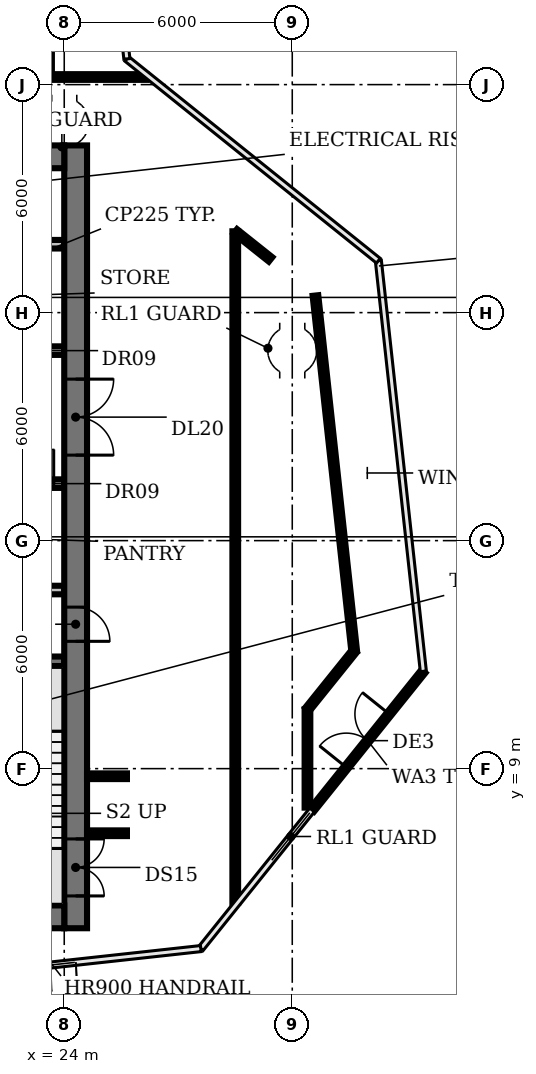
"""IFC4 building model, lengths in metres.
Left out: names, types, materials, properties, quantities, classifications, styles, units other than length and angle.
Written with IfcOpenShell. Run it as: python <this file> out.ifc"""

import sys

from ifc_helpers import new_model, si_unit, direction, frame, frame_2d, origin, place, context, subcontext, project, spatial, rectangle, extrude, element, fill, save


model = new_model("IFC4")
c1 = context("Model", 3, precision=1e-05, world=origin(), true_north=direction((0.0, 1.0)))
c2 = subcontext(c1, "Body", "Model", "MODEL_VIEW")
j1 = project(units=[si_unit("LENGTHUNIT", "METRE"), si_unit("PLANEANGLEUNIT", "RADIAN")], contexts=[c1])
p1 = place(None, origin())
s1 = spatial("IfcSite", under=j1, at=p1, CompositionType="ELEMENT")
p2 = place(p1, origin())
s2 = spatial("IfcBuilding", under=s1, at=p2, CompositionType="ELEMENT")
p3 = place(p2, frame((0.0, 0.0, 197.0)))
s3 = spatial("IfcBuildingStorey", under=s2, at=p3, CompositionType="ELEMENT", Elevation=197.0)
p4 = place(p3, frame((30.521, 7.912, 0.0), z_axis=(0.0, 0.0, 1.0), x_axis=(0.625916397506, 0.779890161069, 0.0)))
e1 = element("IfcWall", 1, at=p4, inside=s3, PredefinedType="SOLIDWALL", context=c2, shape_type="SweptSolid", body=[
    extrude(rectangle(XDim=4.677, YDim=0.14, at=frame_2d((2.339, 0.0))), origin(), (0.0, 0.0, 1.0), 8.05),
])
p5 = place(p4, frame((1.439, 0.0, 0.0)))
e2 = element("IfcOpeningElement", 2, at=p5, cuts=e1, PredefinedType="OPENING", context=c2, shape_type="SweptSolid", body=[
    extrude(rectangle(XDim=1.8, YDim=2.4, at=frame_2d((0.9, 1.2))), frame((0.0, 0.08, 0.0), z_axis=(0.0, -1.0, 0.0), x_axis=(1.0, 0.0, 0.0)), (0.0, 0.0, 1.0), 0.16),
])
p6 = place(p3, frame((20.85, 11.825, 0.0), z_axis=(0.0, 0.0, 1.0), x_axis=(1.0, 0.0, 0.0)))
e3 = element("IfcWall", 3, at=p6, inside=s3, PredefinedType="SHEAR", context=c2, shape_type="SweptSolid", body=[
    extrude(rectangle(XDim=3.15, YDim=0.25, at=frame_2d((1.575, 0.0))), origin(), (0.0, 0.0, 1.0), 8.05),
])
p7 = place(p3, frame((16.6, 13.7, 0.0), z_axis=(0.0, 0.0, 1.0), x_axis=(1.0, 0.0, 0.0)))
e4 = element("IfcWall", 4, at=p7, inside=s3, PredefinedType="PARTITIONING", context=c2, shape_type="SweptSolid", body=[
    extrude(rectangle(XDim=7.4, YDim=0.225, at=frame_2d((3.7, 0.0))), origin(), (0.0, 0.0, 1.0), 8.05),
])
p8 = place(p3, frame((9.4, 16.5, 0.0), z_axis=(0.0, 0.0, 1.0), x_axis=(1.0, 0.0, 0.0)))
e5 = element("IfcWall", 5, at=p8, inside=s3, PredefinedType="PARTITIONING", context=c2, shape_type="SweptSolid", body=[
    extrude(rectangle(XDim=14.6, YDim=0.225, at=frame_2d((7.3, 0.0))), origin(), (0.0, 0.0, 1.0), 8.05),
])
p9 = place(p8, frame((1.6, 0.0, 0.0)))
e6 = element("IfcOpeningElement", 6, at=p9, cuts=e5, PredefinedType="OPENING", context=c2, shape_type="SweptSolid", body=[
    extrude(rectangle(XDim=1.0, YDim=2.1, at=frame_2d((0.5, 1.05))), frame((0.0, 0.123, 0.0), z_axis=(0.0, -1.0, 0.0), x_axis=(1.0, 0.0, 0.0)), (0.0, 0.0, 1.0), 0.245),
])
p10 = place(p8, frame((5.125, 0.0, 0.0)))
e7 = element("IfcOpeningElement", 7, at=p10, cuts=e5, PredefinedType="OPENING", context=c2, shape_type="SweptSolid", body=[
    extrude(rectangle(XDim=0.9, YDim=2.1, at=frame_2d((0.45, 1.05))), frame((0.0, 0.123, 0.0), z_axis=(0.0, -1.0, 0.0), x_axis=(1.0, 0.0, 0.0)), (0.0, 0.0, 1.0), 0.245),
])
p11 = place(p8, frame((7.675, 0.0, 0.0)))
e8 = element("IfcOpeningElement", 8, at=p11, cuts=e5, PredefinedType="OPENING", context=c2, shape_type="SweptSolid", body=[
    extrude(rectangle(XDim=0.9, YDim=2.1, at=frame_2d((0.45, 1.05))), frame((0.0, 0.123, 0.0), z_axis=(0.0, -1.0, 0.0), x_axis=(1.0, 0.0, 0.0)), (0.0, 0.0, 1.0), 0.245),
])
p12 = place(p8, frame((9.775, 0.0, 0.0)))
e9 = element("IfcOpeningElement", 9, at=p12, cuts=e5, PredefinedType="OPENING", context=c2, shape_type="SweptSolid", body=[
    extrude(rectangle(XDim=0.9, YDim=2.1, at=frame_2d((0.45, 1.05))), frame((0.0, 0.123, 0.0), z_axis=(0.0, -1.0, 0.0), x_axis=(1.0, 0.0, 0.0)), (0.0, 0.0, 1.0), 0.245),
])
p13 = place(p8, frame((11.647, 0.0, 0.0)))
e10 = element("IfcOpeningElement", 10, at=p13, cuts=e5, PredefinedType="OPENING", context=c2, shape_type="SweptSolid", body=[
    extrude(rectangle(XDim=0.9, YDim=2.1, at=frame_2d((0.45, 1.05))), frame((0.0, 0.123, 0.0), z_axis=(0.0, -1.0, 0.0), x_axis=(1.0, 0.0, 0.0)), (0.0, 0.0, 1.0), 0.245),
])
p14 = place(p8, frame((13.423, 0.0, 0.0)))
e11 = element("IfcOpeningElement", 11, at=p14, cuts=e5, PredefinedType="OPENING", context=c2, shape_type="SweptSolid", body=[
    extrude(rectangle(XDim=0.9, YDim=2.1, at=frame_2d((0.45, 1.05))), frame((0.0, 0.123, 0.0), z_axis=(0.0, -1.0, 0.0), x_axis=(1.0, 0.0, 0.0)), (0.0, 0.0, 1.0), 0.245),
])
p15 = place(p3, frame((24.0, 20.0, 0.0), z_axis=(0.0, 0.0, 1.0), x_axis=(-1.0, 0.0, 0.0)))
e12 = element("IfcWall", 12, at=p15, inside=s3, PredefinedType="PARTITIONING", context=c2, shape_type="SweptSolid", body=[
    extrude(rectangle(XDim=14.6, YDim=0.225, at=frame_2d((7.3, 0.0))), origin(), (0.0, 0.0, 1.0), 8.05),
])
p16 = place(p15, frame((12.75, 0.0, 0.0)))
e13 = element("IfcOpeningElement", 13, at=p16, cuts=e12, PredefinedType="OPENING", context=c2, shape_type="SweptSolid", body=[
    extrude(rectangle(XDim=1.1, YDim=2.1, at=frame_2d((0.55, 1.05))), frame((0.0, 0.123, 0.0), z_axis=(0.0, -1.0, 0.0), x_axis=(1.0, 0.0, 0.0)), (0.0, 0.0, 1.0), 0.245),
])
p17 = place(p15, frame((9.95, 0.0, 0.0)))
e14 = element("IfcOpeningElement", 14, at=p17, cuts=e12, PredefinedType="OPENING", context=c2, shape_type="SweptSolid", body=[
    extrude(rectangle(XDim=1.1, YDim=2.1, at=frame_2d((0.55, 1.05))), frame((0.0, 0.123, 0.0), z_axis=(0.0, -1.0, 0.0), x_axis=(1.0, 0.0, 0.0)), (0.0, 0.0, 1.0), 0.245),
])
p18 = place(p15, frame((7.15, 0.0, 0.0)))
e15 = element("IfcOpeningElement", 15, at=p18, cuts=e12, PredefinedType="OPENING", context=c2, shape_type="SweptSolid", body=[
    extrude(rectangle(XDim=1.1, YDim=2.1, at=frame_2d((0.55, 1.05))), frame((0.0, 0.123, 0.0), z_axis=(0.0, -1.0, 0.0), x_axis=(1.0, 0.0, 0.0)), (0.0, 0.0, 1.0), 0.245),
])
p19 = place(p15, frame((4.35, 0.0, 0.0)))
e16 = element("IfcOpeningElement", 16, at=p19, cuts=e12, PredefinedType="OPENING", context=c2, shape_type="SweptSolid", body=[
    extrude(rectangle(XDim=1.1, YDim=2.1, at=frame_2d((0.55, 1.05))), frame((0.0, 0.123, 0.0), z_axis=(0.0, -1.0, 0.0), x_axis=(1.0, 0.0, 0.0)), (0.0, 0.0, 1.0), 0.245),
])
p20 = place(p15, frame((2.137, 0.0, 0.0)))
e17 = element("IfcOpeningElement", 17, at=p20, cuts=e12, PredefinedType="OPENING", context=c2, shape_type="SweptSolid", body=[
    extrude(rectangle(XDim=0.9, YDim=2.1, at=frame_2d((0.45, 1.05))), frame((0.0, 0.123, 0.0), z_axis=(0.0, -1.0, 0.0), x_axis=(1.0, 0.0, 0.0)), (0.0, 0.0, 1.0), 0.245),
])
p21 = place(p15, frame((0.363, 0.0, 0.0)))
e18 = element("IfcOpeningElement", 18, at=p21, cuts=e12, PredefinedType="OPENING", context=c2, shape_type="SweptSolid", body=[
    extrude(rectangle(XDim=0.9, YDim=2.1, at=frame_2d((0.45, 1.05))), frame((0.0, 0.123, 0.0), z_axis=(0.0, -1.0, 0.0), x_axis=(1.0, 0.0, 0.0)), (0.0, 0.0, 1.0), 0.245),
])
p22 = place(p3, frame((9.4, 22.8, 0.0), z_axis=(0.0, 0.0, 1.0), x_axis=(1.0, 0.0, 0.0)))
e19 = element("IfcWall", 19, at=p22, inside=s3, PredefinedType="PARTITIONING", context=c2, shape_type="SweptSolid", body=[
    extrude(rectangle(XDim=14.6, YDim=0.225, at=frame_2d((7.3, 0.0))), origin(), (0.0, 0.0, 1.0), 8.05),
])
p23 = place(p3, frame((24.3, 25.4, 0.0), z_axis=(0.0, 0.0, 1.0), x_axis=(0.0, -1.0, 0.0)))
e20 = element("IfcWall", 20, at=p23, inside=s3, PredefinedType="SHEAR", context=c2, shape_type="SweptSolid", body=[
    extrude(rectangle(XDim=20.6, YDim=0.6, at=frame_2d((10.3, 0.0))), origin(), (0.0, 0.0, 1.0), 8.05),
])
p24 = place(p23, frame((18.25, 0.0, 0.0)))
e21 = element("IfcOpeningElement", 21, at=p24, cuts=e20, PredefinedType="OPENING", context=c2, shape_type="SweptSolid", body=[
    extrude(rectangle(XDim=1.5, YDim=2.1, at=frame_2d((0.75, 1.05))), frame((0.0, 0.31, 0.0), z_axis=(0.0, -1.0, 0.0), x_axis=(1.0, 0.0, 0.0)), (0.0, 0.0, 1.0), 0.62),
])
p25 = place(p23, frame((12.15, 0.0, 0.0)))
e22 = element("IfcOpeningElement", 22, at=p25, cuts=e20, PredefinedType="OPENING", context=c2, shape_type="SweptSolid", body=[
    extrude(rectangle(XDim=0.9, YDim=2.1, at=frame_2d((0.45, 1.05))), frame((0.0, 0.31, 0.0), z_axis=(0.0, -1.0, 0.0), x_axis=(1.0, 0.0, 0.0)), (0.0, 0.0, 1.0), 0.62),
])
p26 = place(p23, frame((6.15, 0.0, 0.0)))
e23 = element("IfcOpeningElement", 23, at=p26, cuts=e20, PredefinedType="OPENING", context=c2, shape_type="SweptSolid", body=[
    extrude(rectangle(XDim=2.0, YDim=2.1, at=frame_2d((1.0, 1.05))), frame((0.0, 0.31, 0.0), z_axis=(0.0, -1.0, 0.0), x_axis=(1.0, 0.0, 0.0)), (0.0, 0.0, 1.0), 0.62),
])
p27 = place(p3, frame((24.0, 5.1, 0.0), z_axis=(0.0, 0.0, 1.0), x_axis=(-1.0, 0.0, 0.0)))
e24 = element("IfcWall", 24, at=p27, inside=s3, PredefinedType="SHEAR", context=c2, shape_type="SweptSolid", body=[
    extrude(rectangle(XDim=18.0, YDim=0.6, at=frame_2d((9.0, 0.0))), origin(), (0.0, 0.0, 1.0), 8.05),
])
p28 = place(p27, frame((13.0, 0.0, 0.0)))
e25 = element("IfcOpeningElement", 25, at=p28, cuts=e24, PredefinedType="OPENING", context=c2, shape_type="SweptSolid", body=[
    extrude(rectangle(XDim=1.2, YDim=2.1, at=frame_2d((0.6, 1.05))), frame((0.0, 0.31, 0.0), z_axis=(0.0, -1.0, 0.0), x_axis=(1.0, 0.0, 0.0)), (0.0, 0.0, 1.0), 0.62),
])
p29 = place(p27, frame((4.9, 0.0, 0.0)))
e26 = element("IfcOpeningElement", 26, at=p29, cuts=e24, PredefinedType="OPENING", context=c2, shape_type="SweptSolid", body=[
    extrude(rectangle(XDim=1.0, YDim=2.1, at=frame_2d((0.5, 1.05))), frame((0.0, 0.31, 0.0), z_axis=(0.0, -1.0, 0.0), x_axis=(1.0, 0.0, 0.0)), (0.0, 0.0, 1.0), 0.62),
])
p30 = place(p3, frame((6.0, 25.1, 0.0), z_axis=(0.0, 0.0, 1.0), x_axis=(1.0, 0.0, 0.0)))
e27 = element("IfcWall", 27, at=p30, inside=s3, PredefinedType="SHEAR", context=c2, shape_type="SweptSolid", body=[
    extrude(rectangle(XDim=18.0, YDim=0.6, at=frame_2d((9.0, 0.0))), origin(), (0.0, 0.0, 1.0), 8.05),
])
p31 = place(p3, frame((23.6, 27.2, 0.0), z_axis=(0.0, 0.0, 1.0), x_axis=(1.0, 0.0, 0.0)))
e28 = element("IfcWall", 28, at=p31, inside=s3, PredefinedType="PARTITIONING", context=c2, shape_type="SweptSolid", body=[
    extrude(rectangle(XDim=2.56, YDim=0.15, at=frame_2d((1.28, 0.0))), origin(), (0.0, 0.0, 1.0), 6.33),
])
for number, where, z_axis, x_axis in (
    (29, (24.6, 7.3, 0.0), (0.0, 0.0, 1.0), (1.0, 0.0, 0.0)),
    (30, (24.6, 8.8, 0.0), (0.0, 0.0, 1.0), (1.0, 0.0, 0.0)),
):
    element("IfcWall", number, at=place(p3, frame(where, z_axis=z_axis, x_axis=x_axis)), inside=s3, PredefinedType="PARTITIONING", context=c2, shape_type="SweptSolid", body=[
        extrude(rectangle(XDim=1.05, YDim=0.15, at=frame_2d((0.525, 0.0))), origin(), (0.0, 0.0, 1.0), 6.33),
    ])
p32 = place(p3, frame((28.5, 5.47, 0.0), z_axis=(0.0, 0.0, 1.0), x_axis=(0.0, 1.0, 0.0)))
e31 = element("IfcWall", 31, at=p32, inside=s3, PredefinedType="PARTITIONING", context=c2, shape_type="SweptSolid", body=[
    extrude(rectangle(XDim=17.67, YDim=0.15, at=frame_2d((8.835, 0.0))), origin(), (0.0, 0.0, 1.0), 6.33),
])
p33 = place(p3, frame((28.5, 23.14, 0.0), z_axis=(0.0, 0.0, 1.0), x_axis=(0.782489584665, -0.622663673174, 0.0)))
e32 = element("IfcWall", 32, at=p33, inside=s3, PredefinedType="PARTITIONING", context=c2, shape_type="SweptSolid", body=[
    extrude(rectangle(XDim=1.188, YDim=0.15, at=frame_2d((0.594, 0.0))), origin(), (0.0, 0.0, 1.0), 6.33),
])
p34 = place(p3, frame((30.4, 7.974, 0.0), z_axis=(0.0, 0.0, 1.0), x_axis=(0.0, 1.0, 0.0)))
e33 = element("IfcWall", 33, at=p34, inside=s3, PredefinedType="PARTITIONING", context=c2, shape_type="SweptSolid", body=[
    extrude(rectangle(XDim=2.586, YDim=0.15, at=frame_2d((1.293, 0.0))), origin(), (0.0, 0.0, 1.0), 6.33),
])
p35 = place(p3, frame((30.4, 10.56, 0.0), z_axis=(0.0, 0.0, 1.0), x_axis=(0.626543580843, 0.779386387682, 0.0)))
e34 = element("IfcWall", 34, at=p35, inside=s3, PredefinedType="PARTITIONING", context=c2, shape_type="SweptSolid", body=[
    extrude(rectangle(XDim=1.963, YDim=0.15, at=frame_2d((0.981, 0.0))), origin(), (0.0, 0.0, 1.0), 6.33),
])
p36 = place(p3, frame((30.61, 21.45, 0.0), z_axis=(0.0, 0.0, 1.0), x_axis=(0.108310995825, -0.994117059598, 0.0)))
e35 = element("IfcWall", 35, at=p36, inside=s3, PredefinedType="PARTITIONING", context=c2, shape_type="SweptSolid", body=[
    extrude(rectangle(XDim=9.415, YDim=0.15, at=frame_2d((4.708, 0.0))), origin(), (0.0, 0.0, 1.0), 6.33),
])
p37 = place(p5, origin())
e36 = element("IfcDoor", 36, at=p37, inside=s3, OperationType="DOUBLE_DOOR_DOUBLE_SWING", PredefinedType="DOOR", context=c2, shape_type="SweptSolid", body=[
    extrude(rectangle(XDim=1.8, YDim=2.4, at=frame_2d((0.9, 1.2))), frame((0.0, 0.025, 0.0), z_axis=(0.0, -1.0, 0.0), x_axis=(1.0, 0.0, 0.0)), (0.0, 0.0, 1.0), 0.05),
])
fill(e2, e36)
p38 = place(p14, origin())
e37 = element("IfcDoor", 37, at=p38, inside=s3, OperationType="SINGLE_SWING_RIGHT", PredefinedType="DOOR", context=c2, shape_type="SweptSolid", body=[
    extrude(rectangle(XDim=0.9, YDim=2.1, at=frame_2d((0.45, 1.05))), frame((0.0, 0.025, 0.0), z_axis=(0.0, -1.0, 0.0), x_axis=(1.0, 0.0, 0.0)), (0.0, 0.0, 1.0), 0.05),
])
fill(e11, e37)
p39 = place(p24, origin())
e38 = element("IfcDoor", 38, at=p39, inside=s3, OperationType="DOUBLE_DOOR_SINGLE_SWING", PredefinedType="DOOR", context=c2, shape_type="SweptSolid", body=[
    extrude(rectangle(XDim=1.5, YDim=2.1, at=frame_2d((0.75, 1.05))), frame((0.0, 0.025, 0.0), z_axis=(0.0, -1.0, 0.0), x_axis=(1.0, 0.0, 0.0)), (0.0, 0.0, 1.0), 0.05),
])
fill(e21, e38)
p40 = place(p25, origin())
e39 = element("IfcDoor", 39, at=p40, inside=s3, OperationType="SINGLE_SWING_RIGHT", PredefinedType="DOOR", context=c2, shape_type="SweptSolid", body=[
    extrude(rectangle(XDim=0.9, YDim=2.1, at=frame_2d((0.45, 1.05))), frame((0.0, -0.24, 0.0), z_axis=(0.0, -1.0, 0.0), x_axis=(1.0, 0.0, 0.0)), (0.0, 0.0, 1.0), 0.05),
])
fill(e22, e39)
p41 = place(p26, origin())
e40 = element("IfcDoor", 40, at=p41, inside=s3, OperationType="DOUBLE_DOOR_SINGLE_SWING", PredefinedType="DOOR", context=c2, shape_type="SweptSolid", body=[
    extrude(rectangle(XDim=2.0, YDim=2.1, at=frame_2d((1.0, 1.05))), frame((0.0, 0.025, 0.0), z_axis=(0.0, -1.0, 0.0), x_axis=(1.0, 0.0, 0.0)), (0.0, 0.0, 1.0), 0.05),
])
fill(e23, e40)
save(model, sys.argv[1])
